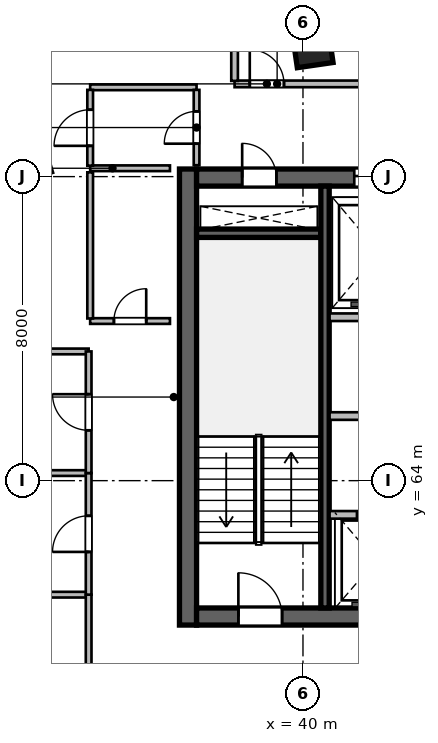
"""IFC4 building model, lengths in metres.
Left out: names, types, materials, properties, quantities, classifications, styles, units other than length and angle.
Written with IfcOpenShell. Run it as: python <this file> out.ifc"""

import sys

from ifc_helpers import new_model, si_unit, direction, frame, frame_2d, origin, origin_2d, place, context, subcontext, project, spatial, rectangle, extrude, source, transform, mapped, element, fill, save


model = new_model("IFC4")
c1 = context("Model", 3, precision=1e-05, world=origin(), true_north=direction((0.0, 1.0)))
c2 = subcontext(c1, "Body", "Model", "MODEL_VIEW")
j1 = project(units=[si_unit("LENGTHUNIT", "METRE"), si_unit("PLANEANGLEUNIT", "RADIAN")], contexts=[c1])
p1 = place(None, origin())
s1 = spatial("IfcSite", under=j1, at=p1, CompositionType="ELEMENT")
p2 = place(p1, origin())
s2 = spatial("IfcBuilding", under=s1, at=p2, CompositionType="ELEMENT")
p3 = place(p2, frame((0.0, 0.0, 235.2)))
s3 = spatial("IfcBuildingStorey", under=s2, at=p3, CompositionType="ELEMENT", Elevation=235.2)
m1 = source(origin(), c2, "Body", "SweptSolid", [
    extrude(rectangle(XDim=12.0, YDim=0.45, at=frame_2d((6.0, 0.0))), origin(), (0.0, 0.0, 1.0), 3.9),
])
p4 = place(p3, frame((36.975, 60.2, 0.0), z_axis=(0.0, 0.0, 1.0), x_axis=(0.0, 1.0, 0.0)))
e1 = element("IfcWall", 1, at=p4, inside=s3, PredefinedType="SHEAR", context=c2, shape_type="MappedRepresentation", body=[
    mapped(m1, transform((0.0, 0.0, 0.0), scale=1.0)),
])
m2 = source(origin(), c2, "Body", "SweptSolid", [
    extrude(rectangle(XDim=21.6, YDim=0.45, at=frame_2d((10.8, 0.0))), origin(), (0.0, 0.0, 1.0), 3.9),
])
p5 = place(p3, frame((37.2, 60.425, 0.0), z_axis=(0.0, 0.0, 1.0), x_axis=(1.0, 0.0, 0.0)))
e2 = element("IfcWall", 2, at=p5, inside=s3, PredefinedType="SHEAR", context=c2, shape_type="MappedRepresentation", body=[
    mapped(m2, transform((0.0, 0.0, 0.0), scale=1.0)),
])
p6 = place(p5, frame((1.1, 0.0, 0.0)))
e3 = element("IfcOpeningElement", 3, at=p6, cuts=e2, PredefinedType="OPENING", context=c2, shape_type="SweptSolid", body=[
    extrude(rectangle(XDim=1.15, YDim=2.15, at=frame_2d((0.575, 1.075))), frame((0.0, 0.235, 0.0), z_axis=(0.0, -1.0, 0.0), x_axis=(1.0, 0.0, 0.0)), (0.0, 0.0, 1.0), 0.47),
])
p7 = place(p5, frame((19.5, 0.0, 0.0)))
e4 = element("IfcOpeningElement", 4, at=p7, cuts=e2, PredefinedType="OPENING", context=c2, shape_type="SweptSolid", body=[
    extrude(rectangle(XDim=0.9, YDim=2.1, at=frame_2d((0.45, 1.05))), frame((0.0, 0.235, 0.0), z_axis=(0.0, -1.0, 0.0), x_axis=(1.0, 0.0, 0.0)), (0.0, 0.0, 1.0), 0.47),
])
p8 = place(p5, frame((12.02, 0.0, 0.0)))
e5 = element("IfcOpeningElement", 5, at=p8, cuts=e2, PredefinedType="OPENING", context=c2, shape_type="SweptSolid", body=[
    extrude(rectangle(XDim=1.6, YDim=2.15, at=frame_2d((0.8, 1.075))), frame((0.0, 0.235, 0.0), z_axis=(0.0, -1.0, 0.0), x_axis=(1.0, 0.0, 0.0)), (0.0, 0.0, 1.0), 0.47),
])
p9 = place(p3, frame((37.2, 71.975, 0.0), z_axis=(0.0, 0.0, 1.0), x_axis=(1.0, 0.0, 0.0)))
e6 = element("IfcWall", 6, at=p9, inside=s3, PredefinedType="SHEAR", context=c2, shape_type="MappedRepresentation", body=[
    mapped(m2, transform((0.0, 0.0, 0.0), scale=1.0)),
])
p10 = place(p9, frame((1.2, 0.0, 0.0)))
e7 = element("IfcOpeningElement", 7, at=p10, cuts=e6, PredefinedType="OPENING", context=c2, shape_type="SweptSolid", body=[
    extrude(rectangle(XDim=0.9, YDim=2.1, at=frame_2d((0.45, 1.05))), frame((0.0, 0.235, 0.0), z_axis=(0.0, -1.0, 0.0), x_axis=(1.0, 0.0, 0.0)), (0.0, 0.0, 1.0), 0.47),
])
p11 = place(p9, frame((14.7, 0.0, 0.0)))
e8 = element("IfcOpeningElement", 8, at=p11, cuts=e6, PredefinedType="OPENING", context=c2, shape_type="SweptSolid", body=[
    extrude(rectangle(XDim=1.2, YDim=2.15, at=frame_2d((0.6, 1.075))), frame((0.0, 0.235, 0.0), z_axis=(0.0, -1.0, 0.0), x_axis=(1.0, 0.0, 0.0)), (0.0, 0.0, 1.0), 0.47),
])
p12 = place(p9, frame((4.15, 0.0, 0.0)))
e9 = element("IfcOpeningElement", 9, at=p12, cuts=e6, PredefinedType="OPENING", context=c2, shape_type="SweptSolid", body=[
    extrude(rectangle(XDim=1.3, YDim=2.15, at=frame_2d((0.65, 1.075))), frame((0.0, 0.235, 0.0), z_axis=(0.0, -1.0, 0.0), x_axis=(1.0, 0.0, 0.0)), (0.0, 0.0, 1.0), 0.47),
])
p13 = place(p9, frame((7.25, 0.0, 0.0)))
e10 = element("IfcOpeningElement", 10, at=p13, cuts=e6, PredefinedType="OPENING", context=c2, shape_type="SweptSolid", body=[
    extrude(rectangle(XDim=0.9, YDim=2.1, at=frame_2d((0.45, 1.05))), frame((0.0, 0.235, 0.0), z_axis=(0.0, -1.0, 0.0), x_axis=(1.0, 0.0, 0.0)), (0.0, 0.0, 1.0), 0.47),
])
p14 = place(p9, frame((10.95, 0.0, 0.0)))
e11 = element("IfcOpeningElement", 11, at=p14, cuts=e6, PredefinedType="OPENING", context=c2, shape_type="SweptSolid", body=[
    extrude(rectangle(XDim=0.9, YDim=2.1, at=frame_2d((0.45, 1.05))), frame((0.0, 0.235, 0.0), z_axis=(0.0, -1.0, 0.0), x_axis=(1.0, 0.0, 0.0)), (0.0, 0.0, 1.0), 0.47),
])
m3 = source(origin(), c2, "Body", "SweptSolid", [
    extrude(rectangle(XDim=3.27, YDim=0.22, at=frame_2d((1.635, 0.0))), origin(), (0.0, 0.0, 1.0), 3.9),
])
p15 = place(p3, frame((37.2, 70.51, 0.0), z_axis=(0.0, 0.0, 1.0), x_axis=(1.0, 0.0, 0.0)))
e12 = element("IfcWall", 12, at=p15, inside=s3, PredefinedType="SHEAR", context=c2, shape_type="MappedRepresentation", body=[
    mapped(m3, transform((0.0, 0.0, 0.0), scale=1.0)),
])
m4 = source(origin(), c2, "Body", "SweptSolid", [
    extrude(rectangle(XDim=11.1, YDim=0.22, at=frame_2d((5.55, 0.0))), origin(), (0.0, 0.0, 1.0), 3.9),
])
p16 = place(p3, frame((40.58, 60.65, 0.0), z_axis=(0.0, 0.0, 1.0), x_axis=(0.0, 1.0, 0.0)))
e13 = element("IfcWall", 13, at=p16, inside=s3, PredefinedType="SHEAR", context=c2, shape_type="MappedRepresentation", body=[
    mapped(m4, transform((0.0, 0.0, 0.0), scale=1.0)),
])
m5 = source(origin(), c2, "Body", "SweptSolid", [
    extrude(rectangle(XDim=0.95, YDim=0.95, at=origin_2d()), origin(), (0.0, 0.0, 1.0), 3.9),
])
p17 = place(p3, frame((40.253, 75.404, 0.0), z_axis=(0.0, 0.0, 1.0), x_axis=(-0.143492621991, 0.98965138682, 0.0)))
e14 = element("IfcColumn", 14, at=p17, inside=s3, PredefinedType="COLUMN", context=c2, shape_type="MappedRepresentation", body=[
    mapped(m5, transform((0.0, 0.0, 0.0), scale=1.0)),
])
m6 = source(origin(), c2, "Body", "SweptSolid", [
    extrude(rectangle(XDim=8.8, YDim=0.2, at=frame_2d((4.4, 0.0))), origin(), (0.0, 0.0, 1.0), 3.65),
])
p18 = place(p3, frame((40.7, 68.3, 0.0), z_axis=(0.0, 0.0, 1.0), x_axis=(1.0, 0.0, 0.0)))
e15 = element("IfcWall", 15, at=p18, inside=s3, PredefinedType="SOLIDWALL", context=c2, shape_type="MappedRepresentation", body=[
    mapped(m6, transform((0.0, 0.0, 0.0), scale=1.0)),
])
m7 = source(origin(), c2, "Body", "SweptSolid", [
    extrude(rectangle(XDim=8.02, YDim=0.2, at=frame_2d((4.01, 0.0))), origin(), (0.0, 0.0, 1.0), 3.65),
])
p19 = place(p3, frame((40.7, 63.1, 0.0), z_axis=(0.0, 0.0, 1.0), x_axis=(1.0, 0.0, 0.0)))
e16 = element("IfcWall", 16, at=p19, inside=s3, PredefinedType="SOLIDWALL", context=c2, shape_type="MappedRepresentation", body=[
    mapped(m7, transform((0.0, 0.0, 0.0), scale=1.0)),
])
p20 = place(p19, frame((0.72, 0.0, 0.0)))
e17 = element("IfcOpeningElement", 17, at=p20, cuts=e16, PredefinedType="OPENING", context=c2, shape_type="SweptSolid", body=[
    extrude(rectangle(XDim=1.0, YDim=2.15, at=frame_2d((0.5, 1.075))), frame((0.0, 0.11, 0.0), z_axis=(0.0, -1.0, 0.0), x_axis=(1.0, 0.0, 0.0)), (0.0, 0.0, 1.0), 0.22),
])
p21 = place(p19, frame((2.62, 0.0, 0.0)))
e18 = element("IfcOpeningElement", 18, at=p21, cuts=e16, PredefinedType="OPENING", context=c2, shape_type="SweptSolid", body=[
    extrude(rectangle(XDim=1.0, YDim=2.15, at=frame_2d((0.5, 1.075))), frame((0.0, 0.11, 0.0), z_axis=(0.0, -1.0, 0.0), x_axis=(1.0, 0.0, 0.0)), (0.0, 0.0, 1.0), 0.22),
])
p22 = place(p19, frame((4.55, 0.0, 0.0)))
e19 = element("IfcOpeningElement", 19, at=p22, cuts=e16, PredefinedType="OPENING", context=c2, shape_type="SweptSolid", body=[
    extrude(rectangle(XDim=1.0, YDim=2.15, at=frame_2d((0.5, 1.075))), frame((0.0, 0.11, 0.0), z_axis=(0.0, -1.0, 0.0), x_axis=(1.0, 0.0, 0.0)), (0.0, 0.0, 1.0), 0.22),
])
p23 = place(p19, frame((6.55, 0.0, 0.0)))
e20 = element("IfcOpeningElement", 20, at=p23, cuts=e16, PredefinedType="OPENING", context=c2, shape_type="SweptSolid", body=[
    extrude(rectangle(XDim=1.0, YDim=2.15, at=frame_2d((0.5, 1.075))), frame((0.0, 0.11, 0.0), z_axis=(0.0, -1.0, 0.0), x_axis=(1.0, 0.0, 0.0)), (0.0, 0.0, 1.0), 0.22),
])
p24 = place(p3, frame((40.7, 65.7, 0.0), z_axis=(0.0, 0.0, 1.0), x_axis=(1.0, 0.0, 0.0)))
e21 = element("IfcWall", 21, at=p24, inside=s3, PredefinedType="SOLIDWALL", context=c2, shape_type="MappedRepresentation", body=[
    mapped(m6, transform((0.0, 0.0, 0.0), scale=1.0)),
])
p25 = place(p24, frame((1.6, 0.0, 0.0)))
e22 = element("IfcOpeningElement", 22, at=p25, cuts=e21, PredefinedType="OPENING", context=c2, shape_type="SweptSolid", body=[
    extrude(rectangle(XDim=0.9, YDim=2.1, at=frame_2d((0.45, 1.05))), frame((0.0, 0.11, 0.0), z_axis=(0.0, -1.0, 0.0), x_axis=(1.0, 0.0, 0.0)), (0.0, 0.0, 1.0), 0.22),
])
p26 = place(p24, frame((6.1, 0.0, 0.0)))
e23 = element("IfcOpeningElement", 23, at=p26, cuts=e21, PredefinedType="OPENING", context=c2, shape_type="SweptSolid", body=[
    extrude(rectangle(XDim=0.9, YDim=2.1, at=frame_2d((0.45, 1.05))), frame((0.0, 0.11, 0.0), z_axis=(0.0, -1.0, 0.0), x_axis=(1.0, 0.0, 0.0)), (0.0, 0.0, 1.0), 0.22),
])
m8 = source(origin(), c2, "Body", "SweptSolid", [
    extrude(rectangle(XDim=2.1, YDim=0.15, at=frame_2d((1.05, 0.0))), origin(), (0.0, 0.0, 1.0), 3.65),
])
p27 = place(p3, frame((34.4, 72.22, 0.0), z_axis=(0.0, 0.0, 1.0), x_axis=(1.0, 0.0, 0.0)))
e24 = element("IfcWall", 24, at=p27, inside=s3, PredefinedType="PARTITIONING", context=c2, shape_type="MappedRepresentation", body=[
    mapped(m8, transform((0.0, 0.0, 0.0), scale=1.0)),
])
m9 = source(origin(), c2, "Body", "SweptSolid", [
    extrude(rectangle(XDim=2.8, YDim=0.15, at=frame_2d((1.4, 0.0))), origin(), (0.0, 0.0, 1.0), 3.65),
])
p28 = place(p3, frame((34.4, 74.35, 0.0), z_axis=(0.0, 0.0, 1.0), x_axis=(1.0, 0.0, 0.0)))
e25 = element("IfcWall", 25, at=p28, inside=s3, PredefinedType="PARTITIONING", context=c2, shape_type="MappedRepresentation", body=[
    mapped(m9, transform((0.0, 0.0, 0.0), scale=1.0)),
])
m10 = source(origin(), c2, "Body", "SweptSolid", [
    extrude(rectangle(XDim=1.995, YDim=0.15, at=frame_2d((0.998, 0.0))), origin(), (0.0, 0.0, 1.0), 3.65),
])
p29 = place(p3, frame((34.4, 72.288, 0.0), z_axis=(0.0, 0.0, 1.0), x_axis=(0.0, 1.0, 0.0)))
e26 = element("IfcWall", 26, at=p29, inside=s3, PredefinedType="PARTITIONING", context=c2, shape_type="MappedRepresentation", body=[
    mapped(m10, transform((0.0, 0.0, 0.0), scale=1.0)),
])
p30 = place(p29, frame((0.522, 0.0, 0.0)))
e27 = element("IfcOpeningElement", 27, at=p30, cuts=e26, PredefinedType="OPENING", context=c2, shape_type="SweptSolid", body=[
    extrude(rectangle(XDim=0.95, YDim=2.1, at=frame_2d((0.475, 1.05))), frame((0.0, 0.085, 0.0), z_axis=(0.0, -1.0, 0.0), x_axis=(1.0, 0.0, 0.0)), (0.0, 0.0, 1.0), 0.17),
])
m11 = source(origin(), c2, "Body", "SweptSolid", [
    extrude(rectangle(XDim=1.982, YDim=0.15, at=frame_2d((0.991, 0.0))), origin(), (0.0, 0.0, 1.0), 3.65),
])
p31 = place(p3, frame((37.2, 72.3, 0.0), z_axis=(0.0, 0.0, 1.0), x_axis=(0.0, 1.0, 0.0)))
e28 = element("IfcWall", 28, at=p31, inside=s3, PredefinedType="PARTITIONING", context=c2, shape_type="MappedRepresentation", body=[
    mapped(m11, transform((0.0, 0.0, 0.0), scale=1.0)),
])
p32 = place(p31, frame((0.566, 0.0, 0.0)))
e29 = element("IfcOpeningElement", 29, at=p32, cuts=e28, PredefinedType="OPENING", context=c2, shape_type="SweptSolid", body=[
    extrude(rectangle(XDim=0.85, YDim=2.1, at=frame_2d((0.425, 1.05))), frame((0.0, 0.085, 0.0), z_axis=(0.0, -1.0, 0.0), x_axis=(1.0, 0.0, 0.0)), (0.0, 0.0, 1.0), 0.17),
])
p33 = place(p3, frame((34.4, 68.2, 0.0), z_axis=(0.0, 0.0, 1.0), x_axis=(1.0, 0.0, 0.0)))
e30 = element("IfcWall", 30, at=p33, inside=s3, PredefinedType="PARTITIONING", context=c2, shape_type="MappedRepresentation", body=[
    mapped(m8, transform((0.0, 0.0, 0.0), scale=1.0)),
])
p34 = place(p33, frame((0.625, 0.0, 0.0)))
e31 = element("IfcOpeningElement", 31, at=p34, cuts=e30, PredefinedType="OPENING", context=c2, shape_type="SweptSolid", body=[
    extrude(rectangle(XDim=0.85, YDim=2.1, at=frame_2d((0.425, 1.05))), frame((0.0, 0.085, 0.0), z_axis=(0.0, -1.0, 0.0), x_axis=(1.0, 0.0, 0.0)), (0.0, 0.0, 1.0), 0.17),
])
m12 = source(origin(), c2, "Body", "SweptSolid", [
    extrude(rectangle(XDim=3.845, YDim=0.15, at=frame_2d((1.922, 0.0))), origin(), (0.0, 0.0, 1.0), 3.65),
])
p35 = place(p3, frame((34.4, 68.268, 0.0), z_axis=(0.0, 0.0, 1.0), x_axis=(0.0, 1.0, 0.0)))
e32 = element("IfcWall", 32, at=p35, inside=s3, PredefinedType="PARTITIONING", context=c2, shape_type="MappedRepresentation", body=[
    mapped(m12, transform((0.0, 0.0, 0.0), scale=1.0)),
])
m13 = source(origin(), c2, "Body", "SweptSolid", [
    extrude(rectangle(XDim=4.0, YDim=0.175, at=frame_2d((2.0, 0.0))), origin(), (0.0, 0.0, 1.0), 3.65),
])
p36 = place(p3, frame((38.2, 74.44, 0.0), z_axis=(0.0, 0.0, 1.0), x_axis=(1.0, 0.0, 0.0)))
e33 = element("IfcWall", 33, at=p36, inside=s3, PredefinedType="PARTITIONING", context=c2, shape_type="MappedRepresentation", body=[
    mapped(m13, transform((0.0, 0.0, 0.0), scale=1.0)),
])
p37 = place(p36, frame((0.4, 0.0, 0.0)))
e34 = element("IfcOpeningElement", 34, at=p37, cuts=e33, PredefinedType="OPENING", context=c2, shape_type="SweptSolid", body=[
    extrude(rectangle(XDim=0.9, YDim=2.08, at=frame_2d((0.45, 1.04))), frame((0.0, 0.098, 0.0), z_axis=(0.0, -1.0, 0.0), x_axis=(1.0, 0.0, 0.0)), (0.0, 0.0, 1.0), 0.195),
])
m14 = source(origin(), c2, "Body", "SweptSolid", [
    extrude(rectangle(XDim=2.403, YDim=0.175, at=frame_2d((1.201, 0.0))), origin(), (0.0, 0.0, 1.0), 3.65),
])
p38 = place(p3, frame((38.2, 74.519, 0.0), z_axis=(0.0, 0.0, 1.0), x_axis=(0.0, 1.0, 0.0)))
e35 = element("IfcWall", 35, at=p38, inside=s3, PredefinedType="PARTITIONING", context=c2, shape_type="MappedRepresentation", body=[
    mapped(m14, transform((0.0, 0.0, 0.0), scale=1.0)),
])
m15 = source(origin(), c2, "Body", "SweptSolid", [
    extrude(rectangle(XDim=17.879, YDim=0.15, at=frame_2d((8.939, 0.0))), origin(), (0.0, 0.0, 1.0), 3.65),
])
p39 = place(p3, frame((16.481, 61.0, 0.0), z_axis=(0.0, 0.0, 1.0), x_axis=(1.0, 0.0, 0.0)))
e36 = element("IfcWall", 36, at=p39, inside=s3, PredefinedType="PARTITIONING", context=c2, shape_type="MappedRepresentation", body=[
    mapped(m15, transform((0.0, 0.0, 0.0), scale=1.0)),
])
m16 = source(origin(), c2, "Body", "SweptSolid", [
    extrude(rectangle(XDim=3.04, YDim=0.15, at=frame_2d((1.52, 0.0))), origin(), (0.0, 0.0, 1.0), 3.65),
])
p40 = place(p3, frame((34.36, 57.96, 0.0), z_axis=(0.0, 0.0, 1.0), x_axis=(0.0, 1.0, 0.0)))
e37 = element("IfcWall", 37, at=p40, inside=s3, PredefinedType="PARTITIONING", context=c2, shape_type="MappedRepresentation", body=[
    mapped(m16, transform((0.0, 0.0, 0.0), scale=1.0)),
])
m17 = source(origin(), c2, "Body", "SweptSolid", [
    extrude(rectangle(XDim=15.501, YDim=0.15, at=frame_2d((7.751, 0.0))), origin(), (0.0, 0.0, 1.0), 3.65),
])
p41 = place(p3, frame((18.859, 64.2, 0.0), z_axis=(0.0, 0.0, 1.0), x_axis=(1.0, 0.0, 0.0)))
e38 = element("IfcWall", 38, at=p41, inside=s3, PredefinedType="PARTITIONING", context=c2, shape_type="MappedRepresentation", body=[
    mapped(m17, transform((0.0, 0.0, 0.0), scale=1.0)),
])
m18 = source(origin(), c2, "Body", "SweptSolid", [
    extrude(rectangle(XDim=3.2, YDim=0.15, at=frame_2d((1.6, 0.0))), origin(), (0.0, 0.0, 1.0), 3.65),
])
p42 = place(p3, frame((34.36, 61.0, 0.0), z_axis=(0.0, 0.0, 1.0), x_axis=(0.0, 1.0, 0.0)))
e39 = element("IfcWall", 39, at=p42, inside=s3, PredefinedType="PARTITIONING", context=c2, shape_type="MappedRepresentation", body=[
    mapped(m18, transform((0.0, 0.0, 0.0), scale=1.0)),
])
p43 = place(p42, frame((1.125, 0.0, 0.0)))
e40 = element("IfcOpeningElement", 40, at=p43, cuts=e39, PredefinedType="OPENING", context=c2, shape_type="SweptSolid", body=[
    extrude(rectangle(XDim=0.95, YDim=2.1, at=frame_2d((0.475, 1.05))), frame((0.0, 0.085, 0.0), z_axis=(0.0, -1.0, 0.0), x_axis=(1.0, 0.0, 0.0)), (0.0, 0.0, 1.0), 0.17),
])
m19 = source(origin(), c2, "Body", "SweptSolid", [
    extrude(rectangle(XDim=12.688, YDim=0.15, at=frame_2d((6.344, 0.0))), origin(), (0.0, 0.0, 1.0), 3.65),
])
p44 = place(p3, frame((21.672, 67.4, 0.0), z_axis=(0.0, 0.0, 1.0), x_axis=(1.0, 0.0, 0.0)))
e41 = element("IfcWall", 41, at=p44, inside=s3, PredefinedType="PARTITIONING", context=c2, shape_type="MappedRepresentation", body=[
    mapped(m19, transform((0.0, 0.0, 0.0), scale=1.0)),
])
p45 = place(p3, frame((34.36, 64.2, 0.0), z_axis=(0.0, 0.0, 1.0), x_axis=(0.0, 1.0, 0.0)))
e42 = element("IfcWall", 42, at=p45, inside=s3, PredefinedType="PARTITIONING", context=c2, shape_type="MappedRepresentation", body=[
    mapped(m18, transform((0.0, 0.0, 0.0), scale=1.0)),
])
p46 = place(p45, frame((1.125, 0.0, 0.0)))
e43 = element("IfcOpeningElement", 43, at=p46, cuts=e42, PredefinedType="OPENING", context=c2, shape_type="SweptSolid", body=[
    extrude(rectangle(XDim=0.95, YDim=2.1, at=frame_2d((0.475, 1.05))), frame((0.0, 0.085, 0.0), z_axis=(0.0, -1.0, 0.0), x_axis=(1.0, 0.0, 0.0)), (0.0, 0.0, 1.0), 0.17),
])
m20 = source(origin(), c2, "Body", "SweptSolid", [
    extrude(rectangle(XDim=1.15, YDim=2.15, at=frame_2d((0.575, 1.075))), frame((0.0, 0.025, 0.0), z_axis=(0.0, -1.0, 0.0), x_axis=(1.0, 0.0, 0.0)), (0.0, 0.0, 1.0), 0.05),
])
p47 = place(p6, origin())
e44 = element("IfcDoor", 44, at=p47, inside=s3, OperationType="SINGLE_SWING_LEFT", PredefinedType="DOOR", context=c2, shape_type="MappedRepresentation", body=[
    mapped(m20, transform((0.0, 0.0, 0.0), scale=1.0)),
])
fill(e3, e44)
m21 = source(origin(), c2, "Body", "SweptSolid", [
    extrude(rectangle(XDim=0.9, YDim=2.1, at=frame_2d((0.45, 1.05))), frame((0.0, 0.025, 0.0), z_axis=(0.0, -1.0, 0.0), x_axis=(1.0, 0.0, 0.0)), (0.0, 0.0, 1.0), 0.05),
])
p48 = place(p10, origin())
e45 = element("IfcDoor", 45, at=p48, inside=s3, OperationType="SINGLE_SWING_LEFT", PredefinedType="DOOR", context=c2, shape_type="MappedRepresentation", body=[
    mapped(m21, transform((0.0, 0.0, 0.0), scale=1.0)),
])
fill(e7, e45)
m22 = source(origin(), c2, "Body", "SweptSolid", [
    extrude(rectangle(XDim=1.3, YDim=2.15, at=frame_2d((0.65, 1.075))), frame((0.0, 0.025, 0.0), z_axis=(0.0, -1.0, 0.0), x_axis=(1.0, 0.0, 0.0)), (0.0, 0.0, 1.0), 0.05),
])
p49 = place(p12, origin())
e46 = element("IfcDoor", 46, at=p49, inside=s3, OperationType="DOUBLE_DOOR_SLIDING", PredefinedType="DOOR", context=c2, shape_type="MappedRepresentation", body=[
    mapped(m22, transform((0.0, 0.0, 0.0), scale=1.0)),
])
fill(e9, e46)
m23 = source(origin(), c2, "Body", "SweptSolid", [
    extrude(rectangle(XDim=1.0, YDim=2.15, at=frame_2d((0.5, 1.075))), frame((0.0, 0.025, 0.0), z_axis=(0.0, -1.0, 0.0), x_axis=(1.0, 0.0, 0.0)), (0.0, 0.0, 1.0), 0.05),
])
p50 = place(p20, origin())
e47 = element("IfcDoor", 47, at=p50, inside=s3, OperationType="DOUBLE_DOOR_SLIDING", PredefinedType="DOOR", context=c2, shape_type="MappedRepresentation", body=[
    mapped(m23, transform((0.0, 0.0, 0.0), scale=1.0)),
])
fill(e17, e47)
m24 = source(origin(), c2, "Body", "SweptSolid", [
    extrude(rectangle(XDim=0.85, YDim=2.1, at=frame_2d((0.425, 1.05))), frame((0.0, 0.025, 0.0), z_axis=(0.0, -1.0, 0.0), x_axis=(1.0, 0.0, 0.0)), (0.0, 0.0, 1.0), 0.05),
])
p51 = place(p32, origin())
e48 = element("IfcDoor", 48, at=p51, inside=s3, OperationType="SINGLE_SWING_LEFT", PredefinedType="DOOR", context=c2, shape_type="MappedRepresentation", body=[
    mapped(m24, transform((0.0, 0.0, 0.0), scale=1.0)),
])
fill(e29, e48)
p52 = place(p34, origin())
e49 = element("IfcDoor", 49, at=p52, inside=s3, OperationType="SINGLE_SWING_RIGHT", PredefinedType="DOOR", context=c2, shape_type="MappedRepresentation", body=[
    mapped(m24, transform((0.0, 0.0, 0.0), scale=1.0)),
])
fill(e31, e49)
m25 = source(origin(), c2, "Body", "SweptSolid", [
    extrude(rectangle(XDim=0.9, YDim=2.08, at=frame_2d((0.45, 1.04))), frame((0.0, 0.025, 0.0), z_axis=(0.0, -1.0, 0.0), x_axis=(1.0, 0.0, 0.0)), (0.0, 0.0, 1.0), 0.05),
])
p53 = place(p37, origin())
e50 = element("IfcDoor", 50, at=p53, inside=s3, OperationType="SINGLE_SWING_LEFT", PredefinedType="DOOR", context=c2, shape_type="MappedRepresentation", body=[
    mapped(m25, transform((0.0, 0.0, 0.0), scale=1.0)),
])
fill(e34, e50)
m26 = source(origin(), c2, "Body", "SweptSolid", [
    extrude(rectangle(XDim=0.95, YDim=2.1, at=frame_2d((0.475, 1.05))), frame((0.0, 0.025, 0.0), z_axis=(0.0, -1.0, 0.0), x_axis=(1.0, 0.0, 0.0)), (0.0, 0.0, 1.0), 0.05),
])
p54 = place(p43, origin())
e51 = element("IfcDoor", 51, at=p54, inside=s3, OperationType="SINGLE_SWING_LEFT", PredefinedType="DOOR", context=c2, shape_type="MappedRepresentation", body=[
    mapped(m26, transform((0.0, 0.0, 0.0), scale=1.0)),
])
fill(e40, e51)
p55 = place(p46, origin())
e52 = element("IfcDoor", 52, at=p55, inside=s3, OperationType="SINGLE_SWING_RIGHT", PredefinedType="DOOR", context=c2, shape_type="MappedRepresentation", body=[
    mapped(m26, transform((0.0, 0.0, 0.0), scale=1.0)),
])
fill(e43, e52)
p56 = place(p30, origin())
e53 = element("IfcDoor", 53, at=p56, inside=s3, OperationType="SINGLE_SWING_LEFT", PredefinedType="DOOR", context=c2, shape_type="MappedRepresentation", body=[
    mapped(m26, transform((0.0, 0.0, 0.0), scale=1.0)),
])
fill(e27, e53)
save(model, sys.argv[1])
